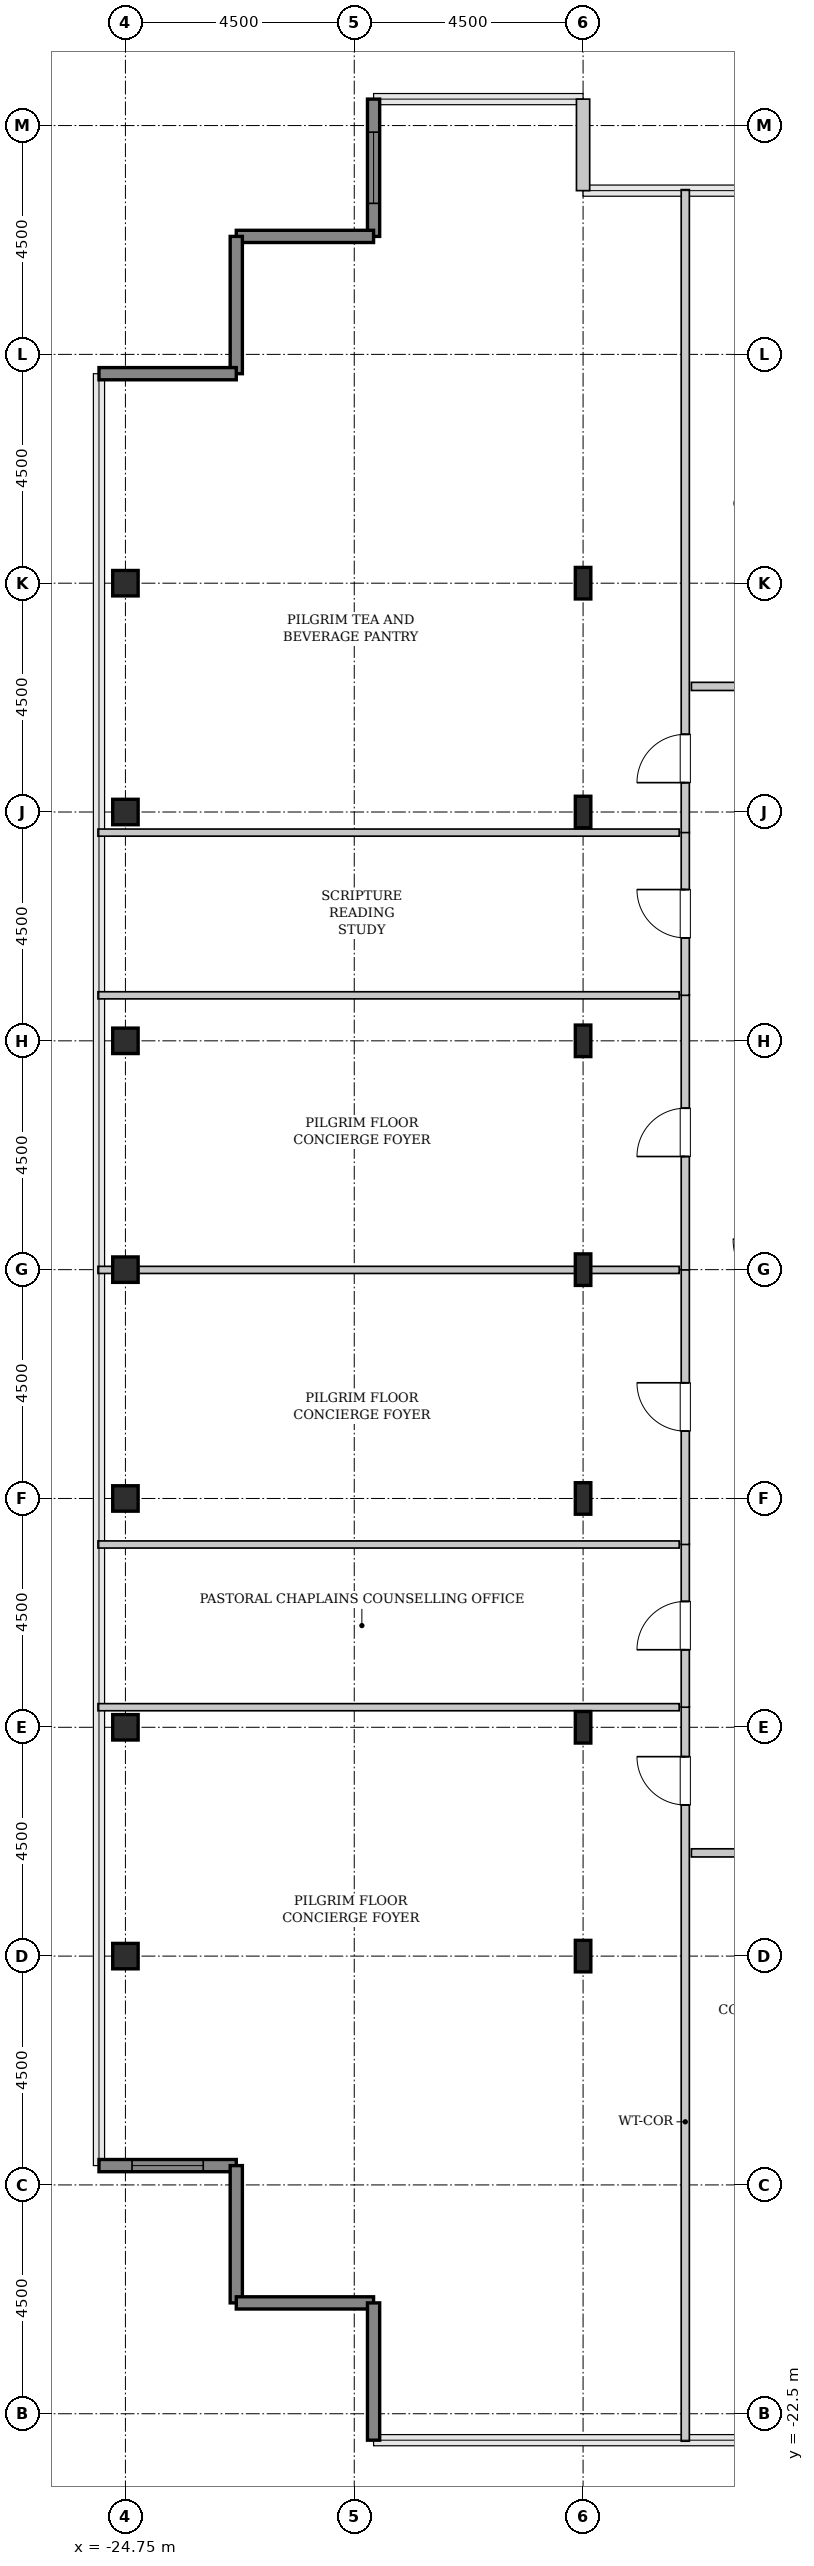
"""IFC4 building model, lengths in metres.
Left out: names, types, materials, properties, quantities, classifications, styles, units other than length and angle.
Written with IfcOpenShell. Run it as: python <this file> out.ifc"""

import sys

from ifc_helpers import new_model, si_unit, direction, frame, frame_2d, origin, origin_2d, place, context, subcontext, project, spatial, rectangle, hollow_rectangle, i_section, extrude, source, transform, mapped, element, fill, save


model = new_model("IFC4")
c1 = context("Model", 3, precision=1e-05, world=origin(), true_north=direction((0.0, 1.0)))
c2 = subcontext(c1, "Body", "Model", "MODEL_VIEW")
j1 = project(units=[si_unit("LENGTHUNIT", "METRE"), si_unit("PLANEANGLEUNIT", "RADIAN")], contexts=[c1])
p1 = place(None, origin())
s1 = spatial("IfcSite", under=j1, at=p1, CompositionType="ELEMENT")
p2 = place(p1, origin())
s2 = spatial("IfcBuilding", under=s1, at=p2, CompositionType="ELEMENT")
p3 = place(p2, frame((0.0, 0.0, 302.6)))
s3 = spatial("IfcBuildingStorey", under=s2, at=p3, CompositionType="ELEMENT", Elevation=302.6)
m1 = source(origin(), c2, "Body", "SweptSolid", [
    extrude(hollow_rectangle(XDim=0.5, YDim=0.5, WallThickness=0.025, InnerFilletRadius=0.025, OuterFilletRadius=0.05, at=origin_2d()), origin(), (0.0, 0.0, 1.0), 3.8),
])
for number, where, z_axis, x_axis in (
    (1, (-24.75, -13.5, 0.0), (0.0, 0.0, 1.0), (1.0, 0.0, 0.0)),
    (2, (-24.75, -9.0, 0.0), (0.0, 0.0, 1.0), (1.0, 0.0, 0.0)),
    (3, (-24.75, -4.5, 0.0), (0.0, 0.0, 1.0), (1.0, 0.0, 0.0)),
    (4, (-24.75, 0.0, 0.0), (0.0, 0.0, 1.0), (1.0, 0.0, 0.0)),
    (5, (-24.75, 4.5, 0.0), (0.0, 0.0, 1.0), (1.0, 0.0, 0.0)),
    (6, (-24.75, 9.0, 0.0), (0.0, 0.0, 1.0), (1.0, 0.0, 0.0)),
    (7, (-24.75, 13.5, 0.0), (0.0, 0.0, 1.0), (1.0, 0.0, 0.0)),
):
    element("IfcColumn", number, at=place(p3, frame(where, z_axis=z_axis, x_axis=x_axis)), inside=s3, PredefinedType="COLUMN", context=c2, shape_type="MappedRepresentation", body=[
        mapped(m1, transform((0.0, 0.0, 0.0), x_axis=(1.0, 0.0, 0.0), y_axis=(0.0, 1.0, 0.0), z_axis=(0.0, 0.0, 1.0), scale=1.0)),
    ])
m2 = source(origin(), c2, "Body", "SweptSolid", [
    extrude(i_section(OverallWidth=0.305, OverallDepth=0.62, WebThickness=0.021, FlangeThickness=0.04, FilletRadius=0.027, at=origin_2d()), origin(), (0.0, 0.0, 1.0), 3.8),
])
for number, where, z_axis, x_axis in (
    (8, (-15.75, -13.5, 0.0), (0.0, 0.0, 1.0), (1.0, 0.0, 0.0)),
    (9, (-15.75, -9.0, 0.0), (0.0, 0.0, 1.0), (1.0, 0.0, 0.0)),
    (10, (-15.75, -4.5, 0.0), (0.0, 0.0, 1.0), (1.0, 0.0, 0.0)),
    (11, (-15.75, 0.0, 0.0), (0.0, 0.0, 1.0), (1.0, 0.0, 0.0)),
    (12, (-15.75, 4.5, 0.0), (0.0, 0.0, 1.0), (1.0, 0.0, 0.0)),
    (13, (-15.75, 9.0, 0.0), (0.0, 0.0, 1.0), (1.0, 0.0, 0.0)),
    (14, (-15.75, 13.5, 0.0), (0.0, 0.0, 1.0), (1.0, 0.0, 0.0)),
):
    element("IfcColumn", number, at=place(p3, frame(where, z_axis=z_axis, x_axis=x_axis)), inside=s3, PredefinedType="COLUMN", context=c2, shape_type="MappedRepresentation", body=[
        mapped(m2, transform((0.0, 0.0, 0.0), x_axis=(1.0, 0.0, 0.0), y_axis=(0.0, 1.0, 0.0), z_axis=(0.0, 0.0, 1.0), scale=1.0)),
    ])
m3 = source(origin(), c2, "Body", "SweptSolid", [
    extrude(rectangle(XDim=1.8, YDim=0.26, at=frame_2d((0.9, 0.0))), origin(), (0.0, 0.0, 1.0), 3.55),
])
p4 = place(p3, frame((-15.75, 21.22, 0.0), z_axis=(0.0, 0.0, 1.0), x_axis=(0.0, 1.0, 0.0)))
e15 = element("IfcWall", 15, at=p4, inside=s3, PredefinedType="SOLIDWALL", context=c2, shape_type="MappedRepresentation", body=[
    mapped(m3, transform((0.0, 0.0, 0.0), x_axis=(1.0, 0.0, 0.0), y_axis=(0.0, 1.0, 0.0), z_axis=(0.0, 0.0, 1.0), scale=1.0)),
])
m4 = source(origin(), c2, "Body", "SweptSolid", [
    extrude(rectangle(XDim=2.7, YDim=0.24, at=frame_2d((1.35, 0.0))), origin(), (0.0, 0.0, 1.0), 3.55),
])
p5 = place(p3, frame((-19.87, 23.02, 0.0), z_axis=(0.0, 0.0, 1.0), x_axis=(0.0, -1.0, 0.0)))
e16 = element("IfcWall", 16, at=p5, inside=s3, PredefinedType="SHEAR", context=c2, shape_type="MappedRepresentation", body=[
    mapped(m4, transform((0.0, 0.0, 0.0), x_axis=(1.0, 0.0, 0.0), y_axis=(0.0, 1.0, 0.0), z_axis=(0.0, 0.0, 1.0), scale=1.0)),
])
p6 = place(p5, frame((0.65, 0.0, 0.85)))
e17 = element("IfcOpeningElement", 17, at=p6, cuts=e16, PredefinedType="OPENING", context=c2, shape_type="SweptSolid", body=[
    extrude(rectangle(XDim=1.4, YDim=1.8, at=frame_2d((0.7, 0.9))), frame((0.0, 0.13, 0.0), z_axis=(0.0, -1.0, 0.0), x_axis=(1.0, 0.0, 0.0)), (0.0, 0.0, 1.0), 0.26),
])
for number, where, z_axis, x_axis in (
    (18, (-19.87, 20.32, 0.0), (0.0, 0.0, 1.0), (-1.0, 0.0, 0.0)),
    (19, (-22.57, 20.32, 0.0), (0.0, 0.0, 1.0), (0.0, -1.0, 0.0)),
    (20, (-22.57, 17.62, 0.0), (0.0, 0.0, 1.0), (-1.0, 0.0, 0.0)),
):
    element("IfcWall", number, at=place(p3, frame(where, z_axis=z_axis, x_axis=x_axis)), inside=s3, PredefinedType="SHEAR", context=c2, shape_type="MappedRepresentation", body=[
        mapped(m4, transform((0.0, 0.0, 0.0), x_axis=(1.0, 0.0, 0.0), y_axis=(0.0, 1.0, 0.0), z_axis=(0.0, 0.0, 1.0), scale=1.0)),
    ])
p7 = place(p3, frame((-25.27, -17.62, 0.0), z_axis=(0.0, 0.0, 1.0), x_axis=(1.0, 0.0, 0.0)))
e21 = element("IfcWall", 21, at=p7, inside=s3, PredefinedType="SHEAR", context=c2, shape_type="MappedRepresentation", body=[
    mapped(m4, transform((0.0, 0.0, 0.0), x_axis=(1.0, 0.0, 0.0), y_axis=(0.0, 1.0, 0.0), z_axis=(0.0, 0.0, 1.0), scale=1.0)),
])
p8 = place(p7, frame((0.65, 0.0, 0.85)))
e22 = element("IfcOpeningElement", 22, at=p8, cuts=e21, PredefinedType="OPENING", context=c2, shape_type="SweptSolid", body=[
    extrude(rectangle(XDim=1.4, YDim=1.8, at=frame_2d((0.7, 0.9))), frame((0.0, 0.13, 0.0), z_axis=(0.0, -1.0, 0.0), x_axis=(1.0, 0.0, 0.0)), (0.0, 0.0, 1.0), 0.26),
])
for number, where, z_axis, x_axis in (
    (23, (-22.57, -17.62, 0.0), (0.0, 0.0, 1.0), (0.0, -1.0, 0.0)),
    (24, (-22.57, -20.32, 0.0), (0.0, 0.0, 1.0), (1.0, 0.0, 0.0)),
    (25, (-19.87, -20.32, 0.0), (0.0, 0.0, 1.0), (0.0, -1.0, 0.0)),
):
    element("IfcWall", number, at=place(p3, frame(where, z_axis=z_axis, x_axis=x_axis)), inside=s3, PredefinedType="SHEAR", context=c2, shape_type="MappedRepresentation", body=[
        mapped(m4, transform((0.0, 0.0, 0.0), x_axis=(1.0, 0.0, 0.0), y_axis=(0.0, 1.0, 0.0), z_axis=(0.0, 0.0, 1.0), scale=1.0)),
    ])
m5 = source(origin(), c2, "Body", "SweptSolid", [
    extrude(rectangle(XDim=14.445, YDim=0.16, at=frame_2d((7.223, 0.0))), origin(), (0.0, 0.0, 1.0), 3.535),
])
p9 = place(p3, frame((-13.74, -23.04, 0.0), z_axis=(0.0, 0.0, 1.0), x_axis=(0.0, 1.0, 0.0)))
e26 = element("IfcWall", 26, at=p9, inside=s3, PredefinedType="PARTITIONING", context=c2, shape_type="MappedRepresentation", body=[
    mapped(m5, transform((0.0, 0.0, 0.0), x_axis=(1.0, 0.0, 0.0), y_axis=(0.0, 1.0, 0.0), z_axis=(0.0, 0.0, 1.0), scale=1.0)),
])
p10 = place(p9, frame((12.512, 0.0, 0.0)))
e27 = element("IfcOpeningElement", 27, at=p10, cuts=e26, PredefinedType="OPENING", context=c2, shape_type="SweptSolid", body=[
    extrude(rectangle(XDim=0.95, YDim=2.1, at=frame_2d((0.475, 1.05))), frame((0.0, 0.09, 0.0), z_axis=(0.0, -1.0, 0.0), x_axis=(1.0, 0.0, 0.0)), (0.0, 0.0, 1.0), 0.18),
])
m6 = source(origin(), c2, "Body", "SweptSolid", [
    extrude(rectangle(XDim=11.43, YDim=0.14, at=frame_2d((5.715, 0.0))), origin(), (0.0, 0.0, 1.0), 2.975),
])
p11 = place(p3, frame((-25.29, -8.605, 0.0), z_axis=(0.0, 0.0, 1.0), x_axis=(1.0, 0.0, 0.0)))
e28 = element("IfcWall", 28, at=p11, inside=s3, PredefinedType="PARTITIONING", context=c2, shape_type="MappedRepresentation", body=[
    mapped(m6, transform((0.0, 0.0, 0.0), x_axis=(1.0, 0.0, 0.0), y_axis=(0.0, 1.0, 0.0), z_axis=(0.0, 0.0, 1.0), scale=1.0)),
])
m7 = source(origin(), c2, "Body", "SweptSolid", [
    extrude(rectangle(XDim=3.21, YDim=0.16, at=frame_2d((1.605, 0.0))), origin(), (0.0, 0.0, 1.0), 3.535),
])
p12 = place(p3, frame((-13.74, -8.605, 0.0), z_axis=(0.0, 0.0, 1.0), x_axis=(0.0, 1.0, 0.0)))
e29 = element("IfcWall", 29, at=p12, inside=s3, PredefinedType="PARTITIONING", context=c2, shape_type="MappedRepresentation", body=[
    mapped(m7, transform((0.0, 0.0, 0.0), x_axis=(1.0, 0.0, 0.0), y_axis=(0.0, 1.0, 0.0), z_axis=(0.0, 0.0, 1.0), scale=1.0)),
])
p13 = place(p12, frame((1.13, 0.0, 0.0)))
e30 = element("IfcOpeningElement", 30, at=p13, cuts=e29, PredefinedType="OPENING", context=c2, shape_type="SweptSolid", body=[
    extrude(rectangle(XDim=0.95, YDim=2.1, at=frame_2d((0.475, 1.05))), frame((0.0, 0.09, 0.0), z_axis=(0.0, -1.0, 0.0), x_axis=(1.0, 0.0, 0.0)), (0.0, 0.0, 1.0), 0.18),
])
m8 = source(origin(), c2, "Body", "SweptSolid", [
    extrude(rectangle(XDim=11.43, YDim=0.14, at=frame_2d((5.715, 0.0))), origin(), (0.0, 0.0, 1.0), 3.535),
])
p14 = place(p3, frame((-25.29, -5.405, 0.0), z_axis=(0.0, 0.0, 1.0), x_axis=(1.0, 0.0, 0.0)))
e31 = element("IfcWall", 31, at=p14, inside=s3, PredefinedType="PARTITIONING", context=c2, shape_type="MappedRepresentation", body=[
    mapped(m8, transform((0.0, 0.0, 0.0), x_axis=(1.0, 0.0, 0.0), y_axis=(0.0, 1.0, 0.0), z_axis=(0.0, 0.0, 1.0), scale=1.0)),
])
m9 = source(origin(), c2, "Body", "SweptSolid", [
    extrude(rectangle(XDim=5.41, YDim=0.16, at=frame_2d((2.705, 0.0))), origin(), (0.0, 0.0, 1.0), 3.535),
])
p15 = place(p3, frame((-13.74, -5.405, 0.0), z_axis=(0.0, 0.0, 1.0), x_axis=(0.0, 1.0, 0.0)))
e32 = element("IfcWall", 32, at=p15, inside=s3, PredefinedType="PARTITIONING", context=c2, shape_type="MappedRepresentation", body=[
    mapped(m9, transform((0.0, 0.0, 0.0), x_axis=(1.0, 0.0, 0.0), y_axis=(0.0, 1.0, 0.0), z_axis=(0.0, 0.0, 1.0), scale=1.0)),
])
p16 = place(p15, frame((2.23, 0.0, 0.0)))
e33 = element("IfcOpeningElement", 33, at=p16, cuts=e32, PredefinedType="OPENING", context=c2, shape_type="SweptSolid", body=[
    extrude(rectangle(XDim=0.95, YDim=2.1, at=frame_2d((0.475, 1.05))), frame((0.0, 0.09, 0.0), z_axis=(0.0, -1.0, 0.0), x_axis=(1.0, 0.0, 0.0)), (0.0, 0.0, 1.0), 0.18),
])
p17 = place(p3, frame((-25.29, -0.005, 0.0), z_axis=(0.0, 0.0, 1.0), x_axis=(1.0, 0.0, 0.0)))
e34 = element("IfcWall", 34, at=p17, inside=s3, PredefinedType="PARTITIONING", context=c2, shape_type="MappedRepresentation", body=[
    mapped(m6, transform((0.0, 0.0, 0.0), x_axis=(1.0, 0.0, 0.0), y_axis=(0.0, 1.0, 0.0), z_axis=(0.0, 0.0, 1.0), scale=1.0)),
])
p18 = place(p3, frame((-13.74, -0.005, 0.0), z_axis=(0.0, 0.0, 1.0), x_axis=(0.0, 1.0, 0.0)))
e35 = element("IfcWall", 35, at=p18, inside=s3, PredefinedType="PARTITIONING", context=c2, shape_type="MappedRepresentation", body=[
    mapped(m9, transform((0.0, 0.0, 0.0), x_axis=(1.0, 0.0, 0.0), y_axis=(0.0, 1.0, 0.0), z_axis=(0.0, 0.0, 1.0), scale=1.0)),
])
p19 = place(p18, frame((2.23, 0.0, 0.0)))
e36 = element("IfcOpeningElement", 36, at=p19, cuts=e35, PredefinedType="OPENING", context=c2, shape_type="SweptSolid", body=[
    extrude(rectangle(XDim=0.95, YDim=2.1, at=frame_2d((0.475, 1.05))), frame((0.0, 0.09, 0.0), z_axis=(0.0, -1.0, 0.0), x_axis=(1.0, 0.0, 0.0)), (0.0, 0.0, 1.0), 0.18),
])
p20 = place(p3, frame((-25.29, 5.395, 0.0), z_axis=(0.0, 0.0, 1.0), x_axis=(1.0, 0.0, 0.0)))
e37 = element("IfcWall", 37, at=p20, inside=s3, PredefinedType="PARTITIONING", context=c2, shape_type="MappedRepresentation", body=[
    mapped(m8, transform((0.0, 0.0, 0.0), x_axis=(1.0, 0.0, 0.0), y_axis=(0.0, 1.0, 0.0), z_axis=(0.0, 0.0, 1.0), scale=1.0)),
])
p21 = place(p3, frame((-13.74, 5.395, 0.0), z_axis=(0.0, 0.0, 1.0), x_axis=(0.0, 1.0, 0.0)))
e38 = element("IfcWall", 38, at=p21, inside=s3, PredefinedType="PARTITIONING", context=c2, shape_type="MappedRepresentation", body=[
    mapped(m7, transform((0.0, 0.0, 0.0), x_axis=(1.0, 0.0, 0.0), y_axis=(0.0, 1.0, 0.0), z_axis=(0.0, 0.0, 1.0), scale=1.0)),
])
p22 = place(p21, frame((1.13, 0.0, 0.0)))
e39 = element("IfcOpeningElement", 39, at=p22, cuts=e38, PredefinedType="OPENING", context=c2, shape_type="SweptSolid", body=[
    extrude(rectangle(XDim=0.95, YDim=2.1, at=frame_2d((0.475, 1.05))), frame((0.0, 0.09, 0.0), z_axis=(0.0, -1.0, 0.0), x_axis=(1.0, 0.0, 0.0)), (0.0, 0.0, 1.0), 0.18),
])
p23 = place(p3, frame((-25.29, 8.595, 0.0), z_axis=(0.0, 0.0, 1.0), x_axis=(1.0, 0.0, 0.0)))
e40 = element("IfcWall", 40, at=p23, inside=s3, PredefinedType="PARTITIONING", context=c2, shape_type="MappedRepresentation", body=[
    mapped(m6, transform((0.0, 0.0, 0.0), x_axis=(1.0, 0.0, 0.0), y_axis=(0.0, 1.0, 0.0), z_axis=(0.0, 0.0, 1.0), scale=1.0)),
])
m10 = source(origin(), c2, "Body", "SweptSolid", [
    extrude(rectangle(XDim=12.645, YDim=0.16, at=frame_2d((6.323, 0.0))), origin(), (0.0, 0.0, 1.0), 3.535),
])
p24 = place(p3, frame((-13.74, 8.595, 0.0), z_axis=(0.0, 0.0, 1.0), x_axis=(0.0, 1.0, 0.0)))
e41 = element("IfcWall", 41, at=p24, inside=s3, PredefinedType="PARTITIONING", context=c2, shape_type="MappedRepresentation", body=[
    mapped(m10, transform((0.0, 0.0, 0.0), x_axis=(1.0, 0.0, 0.0), y_axis=(0.0, 1.0, 0.0), z_axis=(0.0, 0.0, 1.0), scale=1.0)),
])
p25 = place(p24, frame((0.982, 0.0, 0.0)))
e42 = element("IfcOpeningElement", 42, at=p25, cuts=e41, PredefinedType="OPENING", context=c2, shape_type="SweptSolid", body=[
    extrude(rectangle(XDim=0.95, YDim=2.1, at=frame_2d((0.475, 1.05))), frame((0.0, 0.09, 0.0), z_axis=(0.0, -1.0, 0.0), x_axis=(1.0, 0.0, 0.0)), (0.0, 0.0, 1.0), 0.18),
])
m11 = source(origin(), c2, "Body", "SweptSolid", [
    extrude(rectangle(XDim=4.125, YDim=0.16, at=frame_2d((2.062, 0.0))), origin(), (0.0, 0.0, 1.0), 3.535),
])
p26 = place(p3, frame((-13.62, 11.47, 0.0), z_axis=(0.0, 0.0, 1.0), x_axis=(1.0, 0.0, 0.0)))
e43 = element("IfcWall", 43, at=p26, inside=s3, PredefinedType="PARTITIONING", context=c2, shape_type="MappedRepresentation", body=[
    mapped(m11, transform((0.0, 0.0, 0.0), x_axis=(1.0, 0.0, 0.0), y_axis=(0.0, 1.0, 0.0), z_axis=(0.0, 0.0, 1.0), scale=1.0)),
])
p27 = place(p26, frame((1.587, 0.0, 0.0)))
e44 = element("IfcOpeningElement", 44, at=p27, cuts=e43, PredefinedType="OPENING", context=c2, shape_type="SweptSolid", body=[
    extrude(rectangle(XDim=0.95, YDim=2.1, at=frame_2d((0.475, 1.05))), frame((0.0, 0.09, 0.0), z_axis=(0.0, -1.0, 0.0), x_axis=(1.0, 0.0, 0.0)), (0.0, 0.0, 1.0), 0.18),
])
m12 = source(origin(), c2, "Body", "SweptSolid", [
    extrude(rectangle(XDim=3.56, YDim=0.16, at=frame_2d((1.78, 0.0))), origin(), (0.0, 0.0, 1.0), 3.535),
])
p28 = place(p3, frame((-13.62, -11.47, 0.0), z_axis=(0.0, 0.0, 1.0), x_axis=(1.0, 0.0, 0.0)))
e45 = element("IfcWall", 45, at=p28, inside=s3, PredefinedType="PARTITIONING", context=c2, shape_type="MappedRepresentation", body=[
    mapped(m12, transform((0.0, 0.0, 0.0), x_axis=(1.0, 0.0, 0.0), y_axis=(0.0, 1.0, 0.0), z_axis=(0.0, 0.0, 1.0), scale=1.0)),
])
p29 = place(p28, frame((1.305, 0.0, 0.0)))
e46 = element("IfcOpeningElement", 46, at=p29, cuts=e45, PredefinedType="OPENING", context=c2, shape_type="SweptSolid", body=[
    extrude(rectangle(XDim=0.95, YDim=2.1, at=frame_2d((0.475, 1.05))), frame((0.0, 0.09, 0.0), z_axis=(0.0, -1.0, 0.0), x_axis=(1.0, 0.0, 0.0)), (0.0, 0.0, 1.0), 0.18),
])
m13 = source(origin(), c2, "Body", "SweptSolid", [
    extrude(rectangle(XDim=1.4, YDim=1.8, at=frame_2d((0.7, 0.9))), frame((0.0, 0.03, 0.0), z_axis=(0.0, -1.0, 0.0), x_axis=(1.0, 0.0, 0.0)), (0.0, 0.0, 1.0), 0.06),
])
p30 = place(p6, origin())
e47 = element("IfcWindow", 47, at=p30, inside=s3, PartitioningType="SINGLE_PANEL", PredefinedType="WINDOW", context=c2, shape_type="MappedRepresentation", body=[
    mapped(m13, transform((0.0, 0.0, 0.0), x_axis=(1.0, 0.0, 0.0), y_axis=(0.0, 1.0, 0.0), z_axis=(0.0, 0.0, 1.0), scale=1.0)),
])
fill(e17, e47)
p31 = place(p8, origin())
e48 = element("IfcWindow", 48, at=p31, inside=s3, PartitioningType="SINGLE_PANEL", PredefinedType="WINDOW", context=c2, shape_type="MappedRepresentation", body=[
    mapped(m13, transform((0.0, 0.0, 0.0), x_axis=(1.0, 0.0, 0.0), y_axis=(0.0, 1.0, 0.0), z_axis=(0.0, 0.0, 1.0), scale=1.0)),
])
fill(e22, e48)
m14 = source(origin(), c2, "Body", "SweptSolid", [
    extrude(rectangle(XDim=0.95, YDim=2.1, at=frame_2d((0.475, 1.05))), frame((0.0, 0.025, 0.0), z_axis=(0.0, -1.0, 0.0), x_axis=(1.0, 0.0, 0.0)), (0.0, 0.0, 1.0), 0.05),
])
p32 = place(p10, origin())
e49 = element("IfcDoor", 49, at=p32, inside=s3, OperationType="SINGLE_SWING_RIGHT", PredefinedType="DOOR", context=c2, shape_type="MappedRepresentation", body=[
    mapped(m14, transform((0.0, 0.0, 0.0), x_axis=(1.0, 0.0, 0.0), y_axis=(0.0, 1.0, 0.0), z_axis=(0.0, 0.0, 1.0), scale=1.0)),
])
fill(e27, e49)
p33 = place(p13, origin())
e50 = element("IfcDoor", 50, at=p33, inside=s3, OperationType="SINGLE_SWING_LEFT", PredefinedType="DOOR", context=c2, shape_type="MappedRepresentation", body=[
    mapped(m14, transform((0.0, 0.0, 0.0), x_axis=(1.0, 0.0, 0.0), y_axis=(0.0, 1.0, 0.0), z_axis=(0.0, 0.0, 1.0), scale=1.0)),
])
fill(e30, e50)
p34 = place(p16, origin())
e51 = element("IfcDoor", 51, at=p34, inside=s3, OperationType="SINGLE_SWING_RIGHT", PredefinedType="DOOR", context=c2, shape_type="MappedRepresentation", body=[
    mapped(m14, transform((0.0, 0.0, 0.0), x_axis=(1.0, 0.0, 0.0), y_axis=(0.0, 1.0, 0.0), z_axis=(0.0, 0.0, 1.0), scale=1.0)),
])
fill(e33, e51)
p35 = place(p19, origin())
e52 = element("IfcDoor", 52, at=p35, inside=s3, OperationType="SINGLE_SWING_LEFT", PredefinedType="DOOR", context=c2, shape_type="MappedRepresentation", body=[
    mapped(m14, transform((0.0, 0.0, 0.0), x_axis=(1.0, 0.0, 0.0), y_axis=(0.0, 1.0, 0.0), z_axis=(0.0, 0.0, 1.0), scale=1.0)),
])
fill(e36, e52)
p36 = place(p22, origin())
e53 = element("IfcDoor", 53, at=p36, inside=s3, OperationType="SINGLE_SWING_RIGHT", PredefinedType="DOOR", context=c2, shape_type="MappedRepresentation", body=[
    mapped(m14, transform((0.0, 0.0, 0.0), x_axis=(1.0, 0.0, 0.0), y_axis=(0.0, 1.0, 0.0), z_axis=(0.0, 0.0, 1.0), scale=1.0)),
])
fill(e39, e53)
p37 = place(p25, origin())
e54 = element("IfcDoor", 54, at=p37, inside=s3, OperationType="SINGLE_SWING_LEFT", PredefinedType="DOOR", context=c2, shape_type="MappedRepresentation", body=[
    mapped(m14, transform((0.0, 0.0, 0.0), x_axis=(1.0, 0.0, 0.0), y_axis=(0.0, 1.0, 0.0), z_axis=(0.0, 0.0, 1.0), scale=1.0)),
])
fill(e42, e54)
save(model, sys.argv[1])
